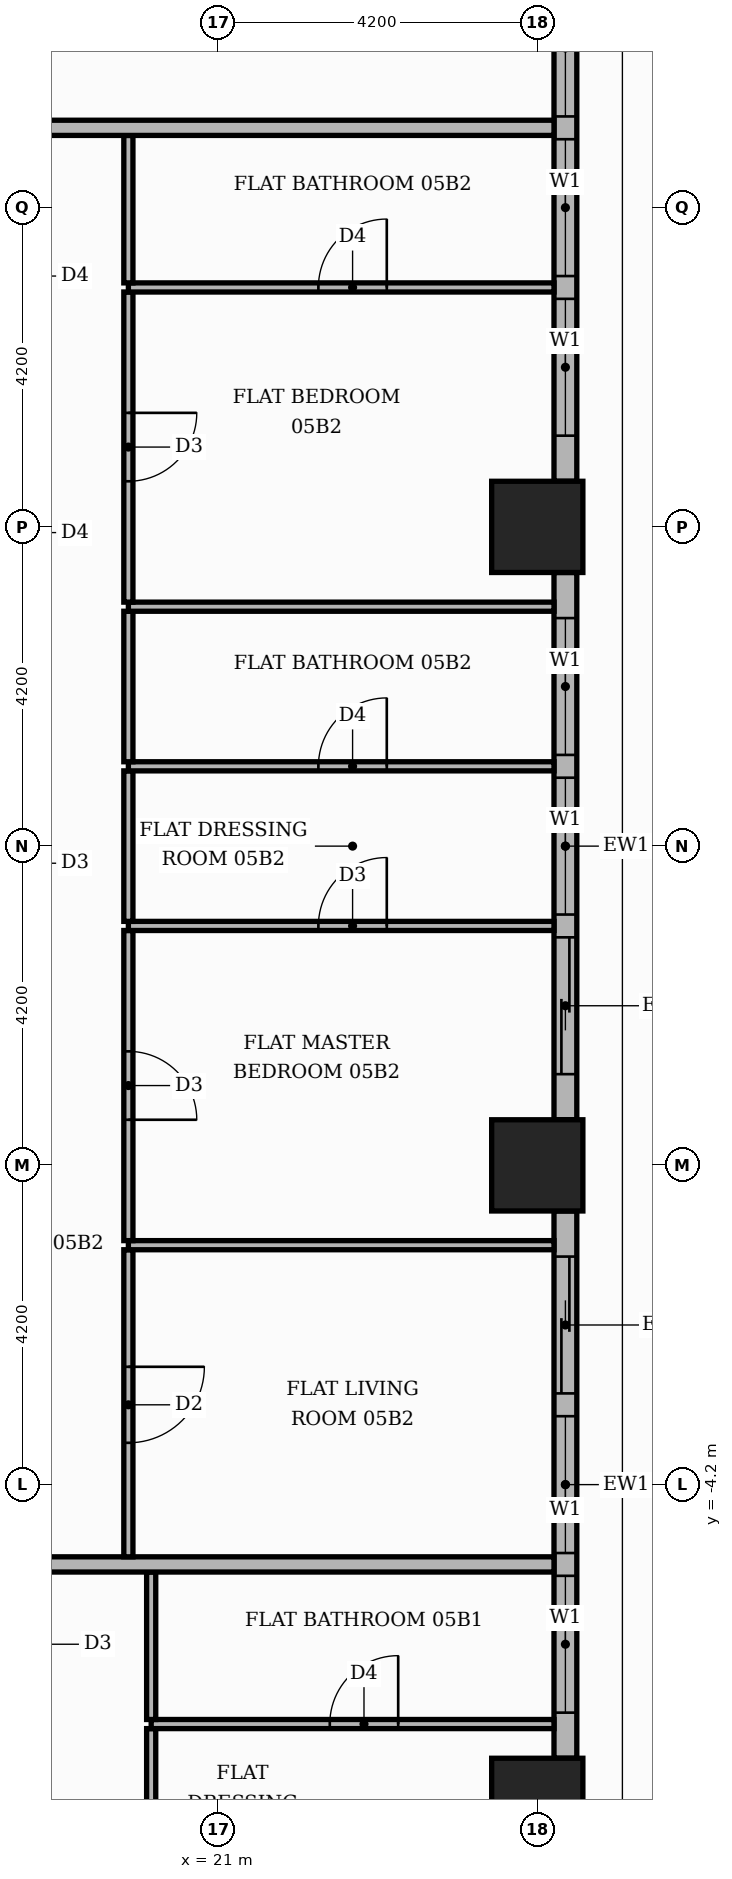
"""IFC4 building model, lengths in metres.
Left out: names, types, materials, properties, quantities, classifications, styles, units other than length and angle.
Written with IfcOpenShell. Run it as: python <this file> out.ifc"""

import sys

from ifc_helpers import new_model, si_unit, direction, frame, frame_2d, origin, origin_2d, place, context, subcontext, project, spatial, rectangle, extrude, element, fill, save


model = new_model("IFC4")
c1 = context("Model", 3, precision=1e-05, world=origin(), true_north=direction((0.0, 1.0)))
c2 = subcontext(c1, "Body", "Model", "MODEL_VIEW")
j1 = project(units=[si_unit("LENGTHUNIT", "METRE"), si_unit("PLANEANGLEUNIT", "RADIAN")], contexts=[c1])
p1 = place(None, origin())
s1 = spatial("IfcSite", under=j1, at=p1, CompositionType="ELEMENT")
p2 = place(p1, origin())
s2 = spatial("IfcBuilding", under=s1, at=p2, CompositionType="ELEMENT")
p3 = place(p2, frame((0.0, 0.0, 27.0)))
s3 = spatial("IfcBuildingStorey", under=s2, at=p3, CompositionType="ELEMENT", Elevation=27.0)
for number, where, z_axis, x_axis in (
    (1, (25.2, 0.0, 0.0), (0.0, 0.0, 1.0), (1.0, 0.0, 0.0)),
    (2, (25.2, 8.4, 0.0), (0.0, 0.0, 1.0), (1.0, 0.0, 0.0)),
    (3, (25.2, -8.4, 0.0), (0.0, 0.0, 1.0), (1.0, 0.0, 0.0)),
):
    element("IfcColumn", number, at=place(p3, frame(where, z_axis=z_axis, x_axis=x_axis)), inside=s3, PredefinedType="COLUMN", context=c2, shape_type="SweptSolid", body=[
        extrude(rectangle(XDim=1.2, YDim=1.2, at=origin_2d()), origin(), (0.0, 0.0, 1.0), 3.9),
    ])
p4 = place(p3, frame((25.57, -7.8, 0.0), z_axis=(0.0, 0.0, 1.0), x_axis=(0.0, 1.0, 0.0)))
e4 = element("IfcWall", 4, at=p4, inside=s3, PredefinedType="STANDARD", context=c2, shape_type="SweptSolid", body=[
    extrude(rectangle(XDim=7.2, YDim=0.3, at=frame_2d((3.6, 0.0))), origin(), (0.0, 0.0, 1.0), 3.48),
])
p5 = place(p4, frame((0.6, 0.0, 0.9)))
e5 = element("IfcOpeningElement", 5, at=p5, cuts=e4, PredefinedType="OPENING", context=c2, shape_type="SweptSolid", body=[
    extrude(rectangle(XDim=1.8, YDim=2.1, at=frame_2d((0.9, 1.05))), frame((0.0, 0.16, 0.0), z_axis=(0.0, -1.0, 0.0), x_axis=(1.0, 0.0, 0.0)), (0.0, 0.0, 1.0), 0.32),
])
p6 = place(p4, frame((2.7, 0.0, 0.9)))
e6 = element("IfcOpeningElement", 6, at=p6, cuts=e4, PredefinedType="OPENING", context=c2, shape_type="SweptSolid", body=[
    extrude(rectangle(XDim=1.8, YDim=2.1, at=frame_2d((0.9, 1.05))), frame((0.0, 0.16, 0.0), z_axis=(0.0, -1.0, 0.0), x_axis=(1.0, 0.0, 0.0)), (0.0, 0.0, 1.0), 0.32),
])
p7 = place(p4, frame((4.8, 0.0, 0.0)))
e7 = element("IfcOpeningElement", 7, at=p7, cuts=e4, PredefinedType="OPENING", context=c2, shape_type="SweptSolid", body=[
    extrude(rectangle(XDim=1.8, YDim=2.4, at=frame_2d((0.9, 1.2))), frame((0.0, 0.16, 0.0), z_axis=(0.0, -1.0, 0.0), x_axis=(1.0, 0.0, 0.0)), (0.0, 0.0, 1.0), 0.32),
])
p8 = place(p3, frame((25.57, 0.6, 0.0), z_axis=(0.0, 0.0, 1.0), x_axis=(0.0, 1.0, 0.0)))
e8 = element("IfcWall", 8, at=p8, inside=s3, PredefinedType="STANDARD", context=c2, shape_type="SweptSolid", body=[
    extrude(rectangle(XDim=7.2, YDim=0.3, at=frame_2d((3.6, 0.0))), origin(), (0.0, 0.0, 1.0), 3.48),
])
p9 = place(p8, frame((0.6, 0.0, 0.0)))
e9 = element("IfcOpeningElement", 9, at=p9, cuts=e8, PredefinedType="OPENING", context=c2, shape_type="SweptSolid", body=[
    extrude(rectangle(XDim=1.8, YDim=2.4, at=frame_2d((0.9, 1.2))), frame((0.0, 0.16, 0.0), z_axis=(0.0, -1.0, 0.0), x_axis=(1.0, 0.0, 0.0)), (0.0, 0.0, 1.0), 0.32),
])
p10 = place(p8, frame((2.7, 0.0, 0.9)))
e10 = element("IfcOpeningElement", 10, at=p10, cuts=e8, PredefinedType="OPENING", context=c2, shape_type="SweptSolid", body=[
    extrude(rectangle(XDim=1.8, YDim=2.1, at=frame_2d((0.9, 1.05))), frame((0.0, 0.16, 0.0), z_axis=(0.0, -1.0, 0.0), x_axis=(1.0, 0.0, 0.0)), (0.0, 0.0, 1.0), 0.32),
])
p11 = place(p8, frame((4.8, 0.0, 0.9)))
e11 = element("IfcOpeningElement", 11, at=p11, cuts=e8, PredefinedType="OPENING", context=c2, shape_type="SweptSolid", body=[
    extrude(rectangle(XDim=1.8, YDim=2.1, at=frame_2d((0.9, 1.05))), frame((0.0, 0.16, 0.0), z_axis=(0.0, -1.0, 0.0), x_axis=(1.0, 0.0, 0.0)), (0.0, 0.0, 1.0), 0.32),
])
p12 = place(p3, frame((25.57, 9.0, 0.0), z_axis=(0.0, 0.0, 1.0), x_axis=(0.0, 1.0, 0.0)))
e12 = element("IfcWall", 12, at=p12, inside=s3, PredefinedType="STANDARD", context=c2, shape_type="SweptSolid", body=[
    extrude(rectangle(XDim=7.2, YDim=0.3, at=frame_2d((3.6, 0.0))), origin(), (0.0, 0.0, 1.0), 3.48),
])
p13 = place(p12, frame((0.6, 0.0, 0.9)))
e13 = element("IfcOpeningElement", 13, at=p13, cuts=e12, PredefinedType="OPENING", context=c2, shape_type="SweptSolid", body=[
    extrude(rectangle(XDim=1.8, YDim=2.1, at=frame_2d((0.9, 1.05))), frame((0.0, 0.16, 0.0), z_axis=(0.0, -1.0, 0.0), x_axis=(1.0, 0.0, 0.0)), (0.0, 0.0, 1.0), 0.32),
])
p14 = place(p12, frame((2.7, 0.0, 0.9)))
e14 = element("IfcOpeningElement", 14, at=p14, cuts=e12, PredefinedType="OPENING", context=c2, shape_type="SweptSolid", body=[
    extrude(rectangle(XDim=1.8, YDim=2.1, at=frame_2d((0.9, 1.05))), frame((0.0, 0.16, 0.0), z_axis=(0.0, -1.0, 0.0), x_axis=(1.0, 0.0, 0.0)), (0.0, 0.0, 1.0), 0.32),
])
p15 = place(p12, frame((4.8, 0.0, 0.9)))
e15 = element("IfcOpeningElement", 15, at=p15, cuts=e12, PredefinedType="OPENING", context=c2, shape_type="SweptSolid", body=[
    extrude(rectangle(XDim=1.8, YDim=2.1, at=frame_2d((0.9, 1.05))), frame((0.0, 0.16, 0.0), z_axis=(0.0, -1.0, 0.0), x_axis=(1.0, 0.0, 0.0)), (0.0, 0.0, 1.0), 0.32),
])
p16 = place(p3, frame((20.12, -9.39, 0.0), z_axis=(0.0, 0.0, 1.0), x_axis=(0.0, 1.0, 0.0)))
e16 = element("IfcWall", 16, at=p16, inside=s3, PredefinedType="PARTITIONING", context=c2, shape_type="SweptSolid", body=[
    extrude(rectangle(XDim=1.98, YDim=0.12, at=frame_2d((0.99, 0.0))), origin(), (0.0, 0.0, 1.0), 3.48),
])
p17 = place(p3, frame((20.12, -7.35, 0.0), z_axis=(0.0, 0.0, 1.0), x_axis=(1.0, 0.0, 0.0)))
e17 = element("IfcWall", 17, at=p17, inside=s3, PredefinedType="PARTITIONING", context=c2, shape_type="SweptSolid", body=[
    extrude(rectangle(XDim=5.3, YDim=0.12, at=frame_2d((2.65, 0.0))), origin(), (0.0, 0.0, 1.0), 3.48),
])
p18 = place(p17, frame((2.35, 0.0, 0.0)))
e18 = element("IfcOpeningElement", 18, at=p18, cuts=e17, PredefinedType="OPENING", context=c2, shape_type="SweptSolid", body=[
    extrude(rectangle(XDim=0.9, YDim=2.1, at=frame_2d((0.45, 1.05))), frame((0.0, 0.07, 0.0), z_axis=(0.0, -1.0, 0.0), x_axis=(1.0, 0.0, 0.0)), (0.0, 0.0, 1.0), 0.14),
])
p19 = place(p3, frame((20.12, -7.29, 0.0), z_axis=(0.0, 0.0, 1.0), x_axis=(0.0, 1.0, 0.0)))
e19 = element("IfcWall", 19, at=p19, inside=s3, PredefinedType="PARTITIONING", context=c2, shape_type="SweptSolid", body=[
    extrude(rectangle(XDim=1.94, YDim=0.12, at=frame_2d((0.97, 0.0))), origin(), (0.0, 0.0, 1.0), 3.48),
])
p20 = place(p3, frame((13.65, -5.25, 0.0), z_axis=(0.0, 0.0, 1.0), x_axis=(1.0, 0.0, 0.0)))
e20 = element("IfcWall", 20, at=p20, inside=s3, PredefinedType="PARTITIONING", context=c2, shape_type="SweptSolid", body=[
    extrude(rectangle(XDim=11.77, YDim=0.2, at=frame_2d((5.885, 0.0))), origin(), (0.0, 0.0, 1.0), 3.48),
])
p21 = place(p3, frame((19.82, -5.15, 0.0), z_axis=(0.0, 0.0, 1.0), x_axis=(0.0, 1.0, 0.0)))
e21 = element("IfcWall", 21, at=p21, inside=s3, PredefinedType="PARTITIONING", context=c2, shape_type="SweptSolid", body=[
    extrude(rectangle(XDim=4.04, YDim=0.12, at=frame_2d((2.02, 0.0))), origin(), (0.0, 0.0, 1.0), 3.48),
])
p22 = place(p21, frame((1.5, 0.0, 0.0)))
e22 = element("IfcOpeningElement", 22, at=p22, cuts=e21, PredefinedType="OPENING", context=c2, shape_type="SweptSolid", body=[
    extrude(rectangle(XDim=1.0, YDim=2.1, at=frame_2d((0.5, 1.05))), frame((0.0, 0.07, 0.0), z_axis=(0.0, -1.0, 0.0), x_axis=(1.0, 0.0, 0.0)), (0.0, 0.0, 1.0), 0.14),
])
p23 = place(p3, frame((19.82, -1.05, 0.0), z_axis=(0.0, 0.0, 1.0), x_axis=(1.0, 0.0, 0.0)))
e23 = element("IfcWall", 23, at=p23, inside=s3, PredefinedType="PARTITIONING", context=c2, shape_type="SweptSolid", body=[
    extrude(rectangle(XDim=5.6, YDim=0.12, at=frame_2d((2.8, 0.0))), origin(), (0.0, 0.0, 1.0), 3.48),
])
p24 = place(p3, frame((19.82, -0.99, 0.0), z_axis=(0.0, 0.0, 1.0), x_axis=(0.0, 1.0, 0.0)))
e24 = element("IfcWall", 24, at=p24, inside=s3, PredefinedType="PARTITIONING", context=c2, shape_type="SweptSolid", body=[
    extrude(rectangle(XDim=4.08, YDim=0.12, at=frame_2d((2.04, 0.0))), origin(), (0.0, 0.0, 1.0), 3.48),
])
p25 = place(p24, frame((1.59, 0.0, 0.0)))
e25 = element("IfcOpeningElement", 25, at=p25, cuts=e24, PredefinedType="OPENING", context=c2, shape_type="SweptSolid", body=[
    extrude(rectangle(XDim=0.9, YDim=2.1, at=frame_2d((0.45, 1.05))), frame((0.0, 0.07, 0.0), z_axis=(0.0, -1.0, 0.0), x_axis=(1.0, 0.0, 0.0)), (0.0, 0.0, 1.0), 0.14),
])
p26 = place(p3, frame((19.82, 3.15, 0.0), z_axis=(0.0, 0.0, 1.0), x_axis=(1.0, 0.0, 0.0)))
e26 = element("IfcWall", 26, at=p26, inside=s3, PredefinedType="PARTITIONING", context=c2, shape_type="SweptSolid", body=[
    extrude(rectangle(XDim=5.6, YDim=0.12, at=frame_2d((2.8, 0.0))), origin(), (0.0, 0.0, 1.0), 3.48),
])
p27 = place(p26, frame((2.5, 0.0, 0.0)))
e27 = element("IfcOpeningElement", 27, at=p27, cuts=e26, PredefinedType="OPENING", context=c2, shape_type="SweptSolid", body=[
    extrude(rectangle(XDim=0.9, YDim=2.1, at=frame_2d((0.45, 1.05))), frame((0.0, 0.07, 0.0), z_axis=(0.0, -1.0, 0.0), x_axis=(1.0, 0.0, 0.0)), (0.0, 0.0, 1.0), 0.14),
])
p28 = place(p3, frame((19.82, 3.21, 0.0), z_axis=(0.0, 0.0, 1.0), x_axis=(0.0, 1.0, 0.0)))
e28 = element("IfcWall", 28, at=p28, inside=s3, PredefinedType="PARTITIONING", context=c2, shape_type="SweptSolid", body=[
    extrude(rectangle(XDim=1.98, YDim=0.12, at=frame_2d((0.99, 0.0))), origin(), (0.0, 0.0, 1.0), 3.48),
])
p29 = place(p3, frame((19.82, 5.25, 0.0), z_axis=(0.0, 0.0, 1.0), x_axis=(1.0, 0.0, 0.0)))
e29 = element("IfcWall", 29, at=p29, inside=s3, PredefinedType="PARTITIONING", context=c2, shape_type="SweptSolid", body=[
    extrude(rectangle(XDim=5.6, YDim=0.12, at=frame_2d((2.8, 0.0))), origin(), (0.0, 0.0, 1.0), 3.48),
])
p30 = place(p29, frame((2.5, 0.0, 0.0)))
e30 = element("IfcOpeningElement", 30, at=p30, cuts=e29, PredefinedType="OPENING", context=c2, shape_type="SweptSolid", body=[
    extrude(rectangle(XDim=0.9, YDim=2.1, at=frame_2d((0.45, 1.05))), frame((0.0, 0.07, 0.0), z_axis=(0.0, -1.0, 0.0), x_axis=(1.0, 0.0, 0.0)), (0.0, 0.0, 1.0), 0.14),
])
p31 = place(p3, frame((19.82, 5.31, 0.0), z_axis=(0.0, 0.0, 1.0), x_axis=(0.0, 1.0, 0.0)))
e31 = element("IfcWall", 31, at=p31, inside=s3, PredefinedType="PARTITIONING", context=c2, shape_type="SweptSolid", body=[
    extrude(rectangle(XDim=1.98, YDim=0.12, at=frame_2d((0.99, 0.0))), origin(), (0.0, 0.0, 1.0), 3.48),
])
p32 = place(p3, frame((19.82, 7.35, 0.0), z_axis=(0.0, 0.0, 1.0), x_axis=(1.0, 0.0, 0.0)))
e32 = element("IfcWall", 32, at=p32, inside=s3, PredefinedType="PARTITIONING", context=c2, shape_type="SweptSolid", body=[
    extrude(rectangle(XDim=5.6, YDim=0.12, at=frame_2d((2.8, 0.0))), origin(), (0.0, 0.0, 1.0), 3.48),
])
p33 = place(p3, frame((19.82, 7.41, 0.0), z_axis=(0.0, 0.0, 1.0), x_axis=(0.0, 1.0, 0.0)))
e33 = element("IfcWall", 33, at=p33, inside=s3, PredefinedType="PARTITIONING", context=c2, shape_type="SweptSolid", body=[
    extrude(rectangle(XDim=4.08, YDim=0.12, at=frame_2d((2.04, 0.0))), origin(), (0.0, 0.0, 1.0), 3.48),
])
p34 = place(p33, frame((1.59, 0.0, 0.0)))
e34 = element("IfcOpeningElement", 34, at=p34, cuts=e33, PredefinedType="OPENING", context=c2, shape_type="SweptSolid", body=[
    extrude(rectangle(XDim=0.9, YDim=2.1, at=frame_2d((0.45, 1.05))), frame((0.0, 0.07, 0.0), z_axis=(0.0, -1.0, 0.0), x_axis=(1.0, 0.0, 0.0)), (0.0, 0.0, 1.0), 0.14),
])
p35 = place(p3, frame((19.82, 11.55, 0.0), z_axis=(0.0, 0.0, 1.0), x_axis=(1.0, 0.0, 0.0)))
e35 = element("IfcWall", 35, at=p35, inside=s3, PredefinedType="PARTITIONING", context=c2, shape_type="SweptSolid", body=[
    extrude(rectangle(XDim=5.6, YDim=0.12, at=frame_2d((2.8, 0.0))), origin(), (0.0, 0.0, 1.0), 3.48),
])
p36 = place(p35, frame((2.5, 0.0, 0.0)))
e36 = element("IfcOpeningElement", 36, at=p36, cuts=e35, PredefinedType="OPENING", context=c2, shape_type="SweptSolid", body=[
    extrude(rectangle(XDim=0.9, YDim=2.1, at=frame_2d((0.45, 1.05))), frame((0.0, 0.07, 0.0), z_axis=(0.0, -1.0, 0.0), x_axis=(1.0, 0.0, 0.0)), (0.0, 0.0, 1.0), 0.14),
])
p37 = place(p3, frame((19.82, 11.61, 0.0), z_axis=(0.0, 0.0, 1.0), x_axis=(0.0, 1.0, 0.0)))
e37 = element("IfcWall", 37, at=p37, inside=s3, PredefinedType="PARTITIONING", context=c2, shape_type="SweptSolid", body=[
    extrude(rectangle(XDim=1.94, YDim=0.12, at=frame_2d((0.97, 0.0))), origin(), (0.0, 0.0, 1.0), 3.48),
])
p38 = place(p3, frame((-13.65, 13.65, 0.0), z_axis=(0.0, 0.0, 1.0), x_axis=(1.0, 0.0, 0.0)))
e38 = element("IfcWall", 38, at=p38, inside=s3, PredefinedType="PARTITIONING", context=c2, shape_type="SweptSolid", body=[
    extrude(rectangle(XDim=39.07, YDim=0.2, at=frame_2d((19.535, 0.0))), origin(), (0.0, 0.0, 1.0), 3.48),
])
p39 = place(p38, frame((24.65, 0.0, 0.0)))
e39 = element("IfcOpeningElement", 39, at=p39, cuts=e38, PredefinedType="OPENING", context=c2, shape_type="SweptSolid", body=[
    extrude(rectangle(XDim=1.1, YDim=2.4, at=frame_2d((0.55, 1.2))), frame((0.0, 0.11, 0.0), z_axis=(0.0, -1.0, 0.0), x_axis=(1.0, 0.0, 0.0)), (0.0, 0.0, 1.0), 0.22),
])
p40 = place(p38, frame((14.15, 0.0, 0.0)))
e40 = element("IfcOpeningElement", 40, at=p40, cuts=e38, PredefinedType="OPENING", context=c2, shape_type="SweptSolid", body=[
    extrude(rectangle(XDim=1.1, YDim=2.4, at=frame_2d((0.55, 1.2))), frame((0.0, 0.11, 0.0), z_axis=(0.0, -1.0, 0.0), x_axis=(1.0, 0.0, 0.0)), (0.0, 0.0, 1.0), 0.22),
])
p41 = place(p5, origin())
e41 = element("IfcWindow", 41, at=p41, inside=s3, PartitioningType="SINGLE_PANEL", PredefinedType="WINDOW", context=c2, shape_type="SweptSolid", body=[
    extrude(rectangle(XDim=1.8, YDim=2.1, at=frame_2d((0.9, 1.05))), frame((0.0, 0.03, 0.0), z_axis=(0.0, -1.0, 0.0), x_axis=(1.0, 0.0, 0.0)), (0.0, 0.0, 1.0), 0.06),
])
fill(e5, e41)
p42 = place(p6, origin())
e42 = element("IfcWindow", 42, at=p42, inside=s3, PartitioningType="SINGLE_PANEL", PredefinedType="WINDOW", context=c2, shape_type="SweptSolid", body=[
    extrude(rectangle(XDim=1.8, YDim=2.1, at=frame_2d((0.9, 1.05))), frame((0.0, 0.03, 0.0), z_axis=(0.0, -1.0, 0.0), x_axis=(1.0, 0.0, 0.0)), (0.0, 0.0, 1.0), 0.06),
])
fill(e6, e42)
p43 = place(p7, origin())
e43 = element("IfcDoor", 43, at=p43, inside=s3, OperationType="SLIDING_TO_RIGHT", PredefinedType="DOOR", context=c2, shape_type="SweptSolid", body=[
    extrude(rectangle(XDim=1.8, YDim=2.4, at=frame_2d((0.9, 1.2))), frame((0.0, 0.025, 0.0), z_axis=(0.0, -1.0, 0.0), x_axis=(1.0, 0.0, 0.0)), (0.0, 0.0, 1.0), 0.05),
])
fill(e7, e43)
p44 = place(p9, origin())
e44 = element("IfcDoor", 44, at=p44, inside=s3, OperationType="SLIDING_TO_LEFT", PredefinedType="DOOR", context=c2, shape_type="SweptSolid", body=[
    extrude(rectangle(XDim=1.8, YDim=2.4, at=frame_2d((0.9, 1.2))), frame((0.0, 0.025, 0.0), z_axis=(0.0, -1.0, 0.0), x_axis=(1.0, 0.0, 0.0)), (0.0, 0.0, 1.0), 0.05),
])
fill(e9, e44)
p45 = place(p10, origin())
e45 = element("IfcWindow", 45, at=p45, inside=s3, PartitioningType="SINGLE_PANEL", PredefinedType="WINDOW", context=c2, shape_type="SweptSolid", body=[
    extrude(rectangle(XDim=1.8, YDim=2.1, at=frame_2d((0.9, 1.05))), frame((0.0, 0.03, 0.0), z_axis=(0.0, -1.0, 0.0), x_axis=(1.0, 0.0, 0.0)), (0.0, 0.0, 1.0), 0.06),
])
fill(e10, e45)
p46 = place(p11, origin())
e46 = element("IfcWindow", 46, at=p46, inside=s3, PartitioningType="SINGLE_PANEL", PredefinedType="WINDOW", context=c2, shape_type="SweptSolid", body=[
    extrude(rectangle(XDim=1.8, YDim=2.1, at=frame_2d((0.9, 1.05))), frame((0.0, 0.03, 0.0), z_axis=(0.0, -1.0, 0.0), x_axis=(1.0, 0.0, 0.0)), (0.0, 0.0, 1.0), 0.06),
])
fill(e11, e46)
p47 = place(p13, origin())
e47 = element("IfcWindow", 47, at=p47, inside=s3, PartitioningType="SINGLE_PANEL", PredefinedType="WINDOW", context=c2, shape_type="SweptSolid", body=[
    extrude(rectangle(XDim=1.8, YDim=2.1, at=frame_2d((0.9, 1.05))), frame((0.0, 0.03, 0.0), z_axis=(0.0, -1.0, 0.0), x_axis=(1.0, 0.0, 0.0)), (0.0, 0.0, 1.0), 0.06),
])
fill(e13, e47)
p48 = place(p14, origin())
e48 = element("IfcWindow", 48, at=p48, inside=s3, PartitioningType="SINGLE_PANEL", PredefinedType="WINDOW", context=c2, shape_type="SweptSolid", body=[
    extrude(rectangle(XDim=1.8, YDim=2.1, at=frame_2d((0.9, 1.05))), frame((0.0, 0.03, 0.0), z_axis=(0.0, -1.0, 0.0), x_axis=(1.0, 0.0, 0.0)), (0.0, 0.0, 1.0), 0.06),
])
fill(e14, e48)
p49 = place(p15, origin())
e49 = element("IfcWindow", 49, at=p49, inside=s3, PartitioningType="SINGLE_PANEL", PredefinedType="WINDOW", context=c2, shape_type="SweptSolid", body=[
    extrude(rectangle(XDim=1.8, YDim=2.1, at=frame_2d((0.9, 1.05))), frame((0.0, 0.03, 0.0), z_axis=(0.0, -1.0, 0.0), x_axis=(1.0, 0.0, 0.0)), (0.0, 0.0, 1.0), 0.06),
])
fill(e15, e49)
p50 = place(p18, origin())
e50 = element("IfcDoor", 50, at=p50, inside=s3, OperationType="SINGLE_SWING_RIGHT", PredefinedType="DOOR", context=c2, shape_type="SweptSolid", body=[
    extrude(rectangle(XDim=0.9, YDim=2.1, at=frame_2d((0.45, 1.05))), frame((0.0, 0.025, 0.0), z_axis=(0.0, -1.0, 0.0), x_axis=(1.0, 0.0, 0.0)), (0.0, 0.0, 1.0), 0.05),
])
fill(e18, e50)
p51 = place(p22, frame((1.0, 0.0, 0.0), z_axis=(0.0, 0.0, 1.0), x_axis=(-1.0, 0.0, 0.0)))
e51 = element("IfcDoor", 51, at=p51, inside=s3, OperationType="SINGLE_SWING_RIGHT", PredefinedType="DOOR", context=c2, shape_type="SweptSolid", body=[
    extrude(rectangle(XDim=1.0, YDim=2.1, at=frame_2d((0.5, 1.05))), frame((0.0, 0.025, 0.0), z_axis=(0.0, -1.0, 0.0), x_axis=(1.0, 0.0, 0.0)), (0.0, 0.0, 1.0), 0.05),
])
fill(e22, e51)
p52 = place(p25, frame((0.9, 0.0, 0.0), z_axis=(0.0, 0.0, 1.0), x_axis=(-1.0, 0.0, 0.0)))
e52 = element("IfcDoor", 52, at=p52, inside=s3, OperationType="SINGLE_SWING_LEFT", PredefinedType="DOOR", context=c2, shape_type="SweptSolid", body=[
    extrude(rectangle(XDim=0.9, YDim=2.1, at=frame_2d((0.45, 1.05))), frame((0.0, 0.025, 0.0), z_axis=(0.0, -1.0, 0.0), x_axis=(1.0, 0.0, 0.0)), (0.0, 0.0, 1.0), 0.05),
])
fill(e25, e52)
p53 = place(p27, origin())
e53 = element("IfcDoor", 53, at=p53, inside=s3, OperationType="SINGLE_SWING_RIGHT", PredefinedType="DOOR", context=c2, shape_type="SweptSolid", body=[
    extrude(rectangle(XDim=0.9, YDim=2.1, at=frame_2d((0.45, 1.05))), frame((0.0, 0.025, 0.0), z_axis=(0.0, -1.0, 0.0), x_axis=(1.0, 0.0, 0.0)), (0.0, 0.0, 1.0), 0.05),
])
fill(e27, e53)
p54 = place(p30, origin())
e54 = element("IfcDoor", 54, at=p54, inside=s3, OperationType="SINGLE_SWING_RIGHT", PredefinedType="DOOR", context=c2, shape_type="SweptSolid", body=[
    extrude(rectangle(XDim=0.9, YDim=2.1, at=frame_2d((0.45, 1.05))), frame((0.0, 0.025, 0.0), z_axis=(0.0, -1.0, 0.0), x_axis=(1.0, 0.0, 0.0)), (0.0, 0.0, 1.0), 0.05),
])
fill(e30, e54)
p55 = place(p34, frame((0.9, 0.0, 0.0), z_axis=(0.0, 0.0, 1.0), x_axis=(-1.0, 0.0, 0.0)))
e55 = element("IfcDoor", 55, at=p55, inside=s3, OperationType="SINGLE_SWING_RIGHT", PredefinedType="DOOR", context=c2, shape_type="SweptSolid", body=[
    extrude(rectangle(XDim=0.9, YDim=2.1, at=frame_2d((0.45, 1.05))), frame((0.0, 0.025, 0.0), z_axis=(0.0, -1.0, 0.0), x_axis=(1.0, 0.0, 0.0)), (0.0, 0.0, 1.0), 0.05),
])
fill(e34, e55)
p56 = place(p36, origin())
e56 = element("IfcDoor", 56, at=p56, inside=s3, OperationType="SINGLE_SWING_RIGHT", PredefinedType="DOOR", context=c2, shape_type="SweptSolid", body=[
    extrude(rectangle(XDim=0.9, YDim=2.1, at=frame_2d((0.45, 1.05))), frame((0.0, 0.025, 0.0), z_axis=(0.0, -1.0, 0.0), x_axis=(1.0, 0.0, 0.0)), (0.0, 0.0, 1.0), 0.05),
])
fill(e36, e56)
save(model, sys.argv[1])
